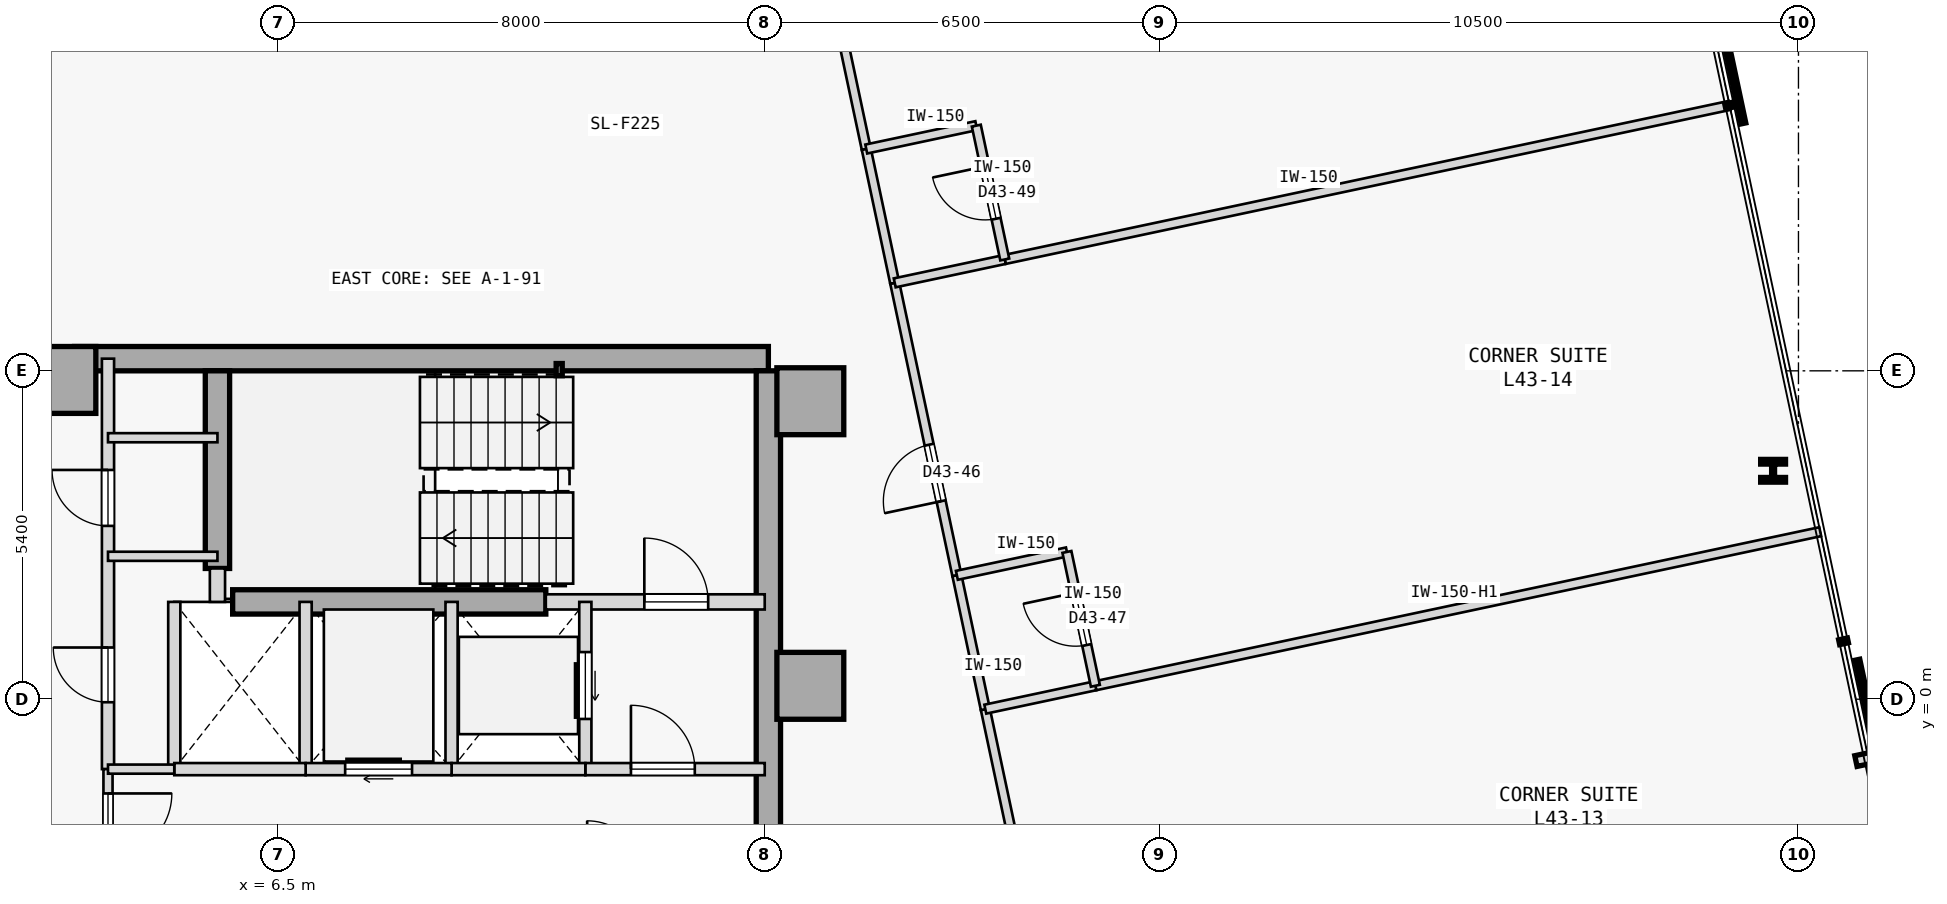
"""IFC4 building model, lengths in metres.
Left out: names, types, materials, properties, quantities, classifications, styles, units other than length and angle.
Written with IfcOpenShell. Run it as: python <this file> out.ifc"""

import sys

from ifc_helpers import new_model, si_unit, direction, frame, frame_2d, origin, origin_2d, place, context, subcontext, project, spatial, rectangle, hollow_rectangle, i_section, extrude, element, fill, save


model = new_model("IFC4")
c1 = context("Model", 3, precision=1e-05, world=origin(), true_north=direction((0.0, 1.0)))
c2 = subcontext(c1, "Body", "Model", "MODEL_VIEW")
j1 = project(units=[si_unit("LENGTHUNIT", "METRE"), si_unit("PLANEANGLEUNIT", "RADIAN")], contexts=[c1])
p1 = place(None, origin())
s1 = spatial("IfcSite", under=j1, at=p1, CompositionType="ELEMENT")
p2 = place(p1, origin())
s2 = spatial("IfcBuilding", under=s1, at=p2, CompositionType="ELEMENT")
p3 = place(p2, frame((0.0, 0.0, 168.4)))
s3 = spatial("IfcBuildingStorey", under=s2, at=p3, CompositionType="ELEMENT", Elevation=168.4)
for number, where, z_axis, x_axis in (
    (1, (15.25, 4.9, 0.0), (0.0, 0.0, 1.0), (1.0, 0.0, 0.0)),
    (2, (15.25, 0.22, 0.0), (0.0, 0.0, 1.0), (1.0, 0.0, 0.0)),
    (3, (2.95, 5.25, 0.0), (0.0, 0.0, 1.0), (1.0, 0.0, 0.0)),
):
    element("IfcColumn", number, at=place(p3, frame(where, z_axis=z_axis, x_axis=x_axis)), inside=s3, PredefinedType="COLUMN", context=c2, shape_type="SweptSolid", body=[
        extrude(rectangle(XDim=1.1, YDim=1.1, at=origin_2d()), origin(), (0.0, 0.0, 1.0), 3.4),
    ])
p4 = place(p3, frame((3.15, 5.6, 0.0), z_axis=(0.0, 0.0, 1.0), x_axis=(1.0, 0.0, 0.0)))
e4 = element("IfcWall", 4, at=p4, inside=s3, PredefinedType="SHEAR", context=c2, shape_type="SweptSolid", body=[
    extrude(rectangle(XDim=11.41, YDim=0.4, at=frame_2d((5.705, 0.0))), origin(), (0.0, 0.0, 1.0), 3.175),
])
p5 = place(p3, frame((14.56, -5.4, 0.0), z_axis=(0.0, 0.0, 1.0), x_axis=(0.0, 1.0, 0.0)))
e5 = element("IfcWall", 5, at=p5, inside=s3, PredefinedType="SHEAR", context=c2, shape_type="SweptSolid", body=[
    extrude(rectangle(XDim=10.8, YDim=0.4, at=frame_2d((5.4, 0.0))), origin(), (0.0, 0.0, 1.0), 3.175),
])
p6 = place(p3, frame((5.5, 2.15, 0.0), z_axis=(0.0, 0.0, 1.0), x_axis=(0.0, 1.0, 0.0)))
e6 = element("IfcWall", 6, at=p6, inside=s3, PredefinedType="SHEAR", context=c2, shape_type="SweptSolid", body=[
    extrude(rectangle(XDim=3.25, YDim=0.4, at=frame_2d((1.625, 0.0))), origin(), (0.0, 0.0, 1.0), 3.175),
])
p7 = place(p3, frame((5.75, 1.6, 0.0), z_axis=(0.0, 0.0, 1.0), x_axis=(1.0, 0.0, 0.0)))
e7 = element("IfcWall", 7, at=p7, inside=s3, PredefinedType="SHEAR", context=c2, shape_type="SweptSolid", body=[
    extrude(rectangle(XDim=5.15, YDim=0.4, at=frame_2d((2.575, 0.0))), origin(), (0.0, 0.0, 1.0), 3.175),
])
p8 = place(p3, frame((11.12, 5.42, 0.0), z_axis=(0.0, 0.0, 1.0), x_axis=(1.0, 0.0, 0.0)))
e8 = element("IfcColumn", 8, at=p8, inside=s3, PredefinedType="COLUMN", context=c2, shape_type="SweptSolid", body=[
    extrude(hollow_rectangle(XDim=0.1, YDim=0.2, WallThickness=0.008, at=origin_2d()), origin(), (0.0, 0.0, 1.0), 3.4),
])
p9 = place(p3, frame((31.083, 3.756, 0.0), z_axis=(0.0, 0.0, 1.0), x_axis=(1.0, 0.0, 0.0)))
e9 = element("IfcColumn", 9, at=p9, inside=s3, PredefinedType="COLUMN", context=c2, shape_type="SweptSolid", body=[
    extrude(i_section(OverallWidth=0.409, OverallDepth=0.374, WebThickness=0.048, FlangeThickness=0.077, FilletRadius=0.015, at=origin_2d()), origin(), (0.0, 0.0, 1.0), 3.4),
])
p10 = place(p3, frame((10.9, 1.6, 0.0), z_axis=(0.0, 0.0, 1.0), x_axis=(1.0, 0.0, 0.0)))
e10 = element("IfcWall", 10, at=p10, inside=s3, PredefinedType="STANDARD", context=c2, shape_type="SweptSolid", body=[
    extrude(rectangle(XDim=3.6, YDim=0.25, at=frame_2d((1.8, 0.0))), origin(), (0.0, 0.0, 1.0), 3.175),
])
p11 = place(p10, frame((1.62, 0.0, 0.0)))
e11 = element("IfcOpeningElement", 11, at=p11, cuts=e10, PredefinedType="OPENING", context=c2, shape_type="SweptSolid", body=[
    extrude(rectangle(XDim=1.05, YDim=2.15, at=frame_2d((0.525, 1.075))), frame((0.0, 0.135, 0.0), z_axis=(0.0, -1.0, 0.0), x_axis=(1.0, 0.0, 0.0)), (0.0, 0.0, 1.0), 0.27),
])
p12 = place(p3, frame((5.5, 1.6, 0.0), z_axis=(0.0, 0.0, 1.0), x_axis=(0.0, 1.0, 0.0)))
e12 = element("IfcWall", 12, at=p12, inside=s3, PredefinedType="STANDARD", context=c2, shape_type="SweptSolid", body=[
    extrude(rectangle(XDim=0.55, YDim=0.25, at=frame_2d((0.275, 0.0))), origin(), (0.0, 0.0, 1.0), 3.175),
])
p13 = place(p3, frame((3.7, -1.15, 0.0), z_axis=(0.0, 0.0, 1.0), x_axis=(0.0, 1.0, 0.0)))
e13 = element("IfcWall", 13, at=p13, inside=s3, PredefinedType="STANDARD", context=c2, shape_type="SweptSolid", body=[
    extrude(rectangle(XDim=6.75, YDim=0.2, at=frame_2d((3.375, 0.0))), origin(), (0.0, 0.0, 1.0), 3.175),
])
p14 = place(p13, frame((1.1, 0.0, 0.0)))
e14 = element("IfcOpeningElement", 14, at=p14, cuts=e13, PredefinedType="OPENING", context=c2, shape_type="SweptSolid", body=[
    extrude(rectangle(XDim=0.9, YDim=2.15, at=frame_2d((0.45, 1.075))), frame((0.0, 0.11, 0.0), z_axis=(0.0, -1.0, 0.0), x_axis=(1.0, 0.0, 0.0)), (0.0, 0.0, 1.0), 0.22),
])
p15 = place(p13, frame((4.0, 0.0, 0.0)))
e15 = element("IfcOpeningElement", 15, at=p15, cuts=e13, PredefinedType="OPENING", context=c2, shape_type="SweptSolid", body=[
    extrude(rectangle(XDim=0.92, YDim=2.15, at=frame_2d((0.46, 1.075))), frame((0.0, 0.11, 0.0), z_axis=(0.0, -1.0, 0.0), x_axis=(1.0, 0.0, 0.0)), (0.0, 0.0, 1.0), 0.22),
])
p16 = place(p3, frame((3.7, -2.95, 0.0), z_axis=(0.0, 0.0, 1.0), x_axis=(0.0, 1.0, 0.0)))
e16 = element("IfcWall", 16, at=p16, inside=s3, PredefinedType="PARTITIONING", context=c2, shape_type="SweptSolid", body=[
    extrude(rectangle(XDim=1.8, YDim=0.15, at=frame_2d((0.9, 0.0))), origin(), (0.0, 0.0, 1.0), 3.175),
])
p17 = place(p16, frame((0.35, 0.0, 0.0)))
e17 = element("IfcOpeningElement", 17, at=p17, cuts=e16, PredefinedType="OPENING", context=c2, shape_type="SweptSolid", body=[
    extrude(rectangle(XDim=1.05, YDim=2.18, at=frame_2d((0.525, 1.09))), frame((0.0, 0.085, 0.0), z_axis=(0.0, -1.0, 0.0), x_axis=(1.0, 0.0, 0.0)), (0.0, 0.0, 1.0), 0.17),
])
p18 = place(p3, frame((11.55, -1.15, 0.0), z_axis=(0.0, 0.0, 1.0), x_axis=(0.0, 1.0, 0.0)))
e18 = element("IfcWall", 18, at=p18, inside=s3, PredefinedType="STANDARD", context=c2, shape_type="SweptSolid", body=[
    extrude(rectangle(XDim=2.75, YDim=0.2, at=frame_2d((1.375, 0.0))), origin(), (0.0, 0.0, 1.0), 3.175),
])
p19 = place(p18, frame((0.825, 0.0, 0.0)))
e19 = element("IfcOpeningElement", 19, at=p19, cuts=e18, PredefinedType="OPENING", context=c2, shape_type="SweptSolid", body=[
    extrude(rectangle(XDim=1.1, YDim=2.15, at=frame_2d((0.55, 1.075))), frame((0.0, 0.11, 0.0), z_axis=(0.0, -1.0, 0.0), x_axis=(1.0, 0.0, 0.0)), (0.0, 0.0, 1.0), 0.22),
])
p20 = place(p3, frame((9.35, -1.15, 0.0), z_axis=(0.0, 0.0, 1.0), x_axis=(0.0, 1.0, 0.0)))
e20 = element("IfcWall", 20, at=p20, inside=s3, PredefinedType="STANDARD", context=c2, shape_type="SweptSolid", body=[
    extrude(rectangle(XDim=2.75, YDim=0.2, at=frame_2d((1.375, 0.0))), origin(), (0.0, 0.0, 1.0), 3.175),
])
p21 = place(p3, frame((11.55, -1.15, 0.0), z_axis=(0.0, 0.0, 1.0), x_axis=(1.0, 0.0, 0.0)))
e21 = element("IfcWall", 21, at=p21, inside=s3, PredefinedType="STANDARD", context=c2, shape_type="SweptSolid", body=[
    extrude(rectangle(XDim=2.95, YDim=0.2, at=frame_2d((1.475, 0.0))), origin(), (0.0, 0.0, 1.0), 3.175),
])
p22 = place(p21, frame((0.75, 0.0, 0.0)))
e22 = element("IfcOpeningElement", 22, at=p22, cuts=e21, PredefinedType="OPENING", context=c2, shape_type="SweptSolid", body=[
    extrude(rectangle(XDim=1.05, YDim=2.18, at=frame_2d((0.525, 1.09))), frame((0.0, 0.11, 0.0), z_axis=(0.0, -1.0, 0.0), x_axis=(1.0, 0.0, 0.0)), (0.0, 0.0, 1.0), 0.22),
])
p23 = place(p3, frame((9.35, -1.15, 0.0), z_axis=(0.0, 0.0, 1.0), x_axis=(1.0, 0.0, 0.0)))
e23 = element("IfcWall", 23, at=p23, inside=s3, PredefinedType="STANDARD", context=c2, shape_type="SweptSolid", body=[
    extrude(rectangle(XDim=2.2, YDim=0.2, at=frame_2d((1.1, 0.0))), origin(), (0.0, 0.0, 1.0), 3.175),
])
p24 = place(p3, frame((6.95, -1.15, 0.0), z_axis=(0.0, 0.0, 1.0), x_axis=(0.0, 1.0, 0.0)))
e24 = element("IfcWall", 24, at=p24, inside=s3, PredefinedType="STANDARD", context=c2, shape_type="SweptSolid", body=[
    extrude(rectangle(XDim=2.75, YDim=0.2, at=frame_2d((1.375, 0.0))), origin(), (0.0, 0.0, 1.0), 3.175),
])
p25 = place(p3, frame((6.95, -1.15, 0.0), z_axis=(0.0, 0.0, 1.0), x_axis=(1.0, 0.0, 0.0)))
e25 = element("IfcWall", 25, at=p25, inside=s3, PredefinedType="STANDARD", context=c2, shape_type="SweptSolid", body=[
    extrude(rectangle(XDim=2.4, YDim=0.2, at=frame_2d((1.2, 0.0))), origin(), (0.0, 0.0, 1.0), 3.175),
])
p26 = place(p25, frame((0.65, 0.0, 0.0)))
e26 = element("IfcOpeningElement", 26, at=p26, cuts=e25, PredefinedType="OPENING", context=c2, shape_type="SweptSolid", body=[
    extrude(rectangle(XDim=1.1, YDim=2.15, at=frame_2d((0.55, 1.075))), frame((0.0, 0.11, 0.0), z_axis=(0.0, -1.0, 0.0), x_axis=(1.0, 0.0, 0.0)), (0.0, 0.0, 1.0), 0.22),
])
p27 = place(p3, frame((4.79, -1.15, 0.0), z_axis=(0.0, 0.0, 1.0), x_axis=(0.0, 1.0, 0.0)))
e27 = element("IfcWall", 27, at=p27, inside=s3, PredefinedType="STANDARD", context=c2, shape_type="SweptSolid", body=[
    extrude(rectangle(XDim=2.75, YDim=0.2, at=frame_2d((1.375, 0.0))), origin(), (0.0, 0.0, 1.0), 3.175),
])
p28 = place(p3, frame((4.79, -1.15, 0.0), z_axis=(0.0, 0.0, 1.0), x_axis=(1.0, 0.0, 0.0)))
e28 = element("IfcWall", 28, at=p28, inside=s3, PredefinedType="STANDARD", context=c2, shape_type="SweptSolid", body=[
    extrude(rectangle(XDim=2.16, YDim=0.2, at=frame_2d((1.08, 0.0))), origin(), (0.0, 0.0, 1.0), 3.175),
])
p29 = place(p3, frame((3.7, -1.15, 0.0), z_axis=(0.0, 0.0, 1.0), x_axis=(1.0, 0.0, 0.0)))
e29 = element("IfcWall", 29, at=p29, inside=s3, PredefinedType="PARTITIONING", context=c2, shape_type="SweptSolid", body=[
    extrude(rectangle(XDim=1.09, YDim=0.15, at=frame_2d((0.545, 0.0))), origin(), (0.0, 0.0, 1.0), 3.175),
])
for number, where, z_axis, x_axis in (
    (30, (3.7, 4.3, 0.0), (0.0, 0.0, 1.0), (1.0, 0.0, 0.0)),
    (31, (3.7, 2.35, 0.0), (0.0, 0.0, 1.0), (1.0, 0.0, 0.0)),
):
    element("IfcWall", number, at=place(p3, frame(where, z_axis=z_axis, x_axis=x_axis)), inside=s3, PredefinedType="PARTITIONING", context=c2, shape_type="SweptSolid", body=[
        extrude(rectangle(XDim=1.8, YDim=0.15, at=frame_2d((0.9, 0.0))), origin(), (0.0, 0.0, 1.0), 3.175),
    ])
p30 = place(p3, frame((19.15, -4.972, 0.0), z_axis=(0.0, 0.0, 1.0), x_axis=(-0.207934781332, 0.978142692409, 0.0)))
e32 = element("IfcWall", 32, at=p30, inside=s3, PredefinedType="PARTITIONING", context=c2, shape_type="SweptSolid", body=[
    extrude(rectangle(XDim=4.916, YDim=0.15, at=frame_2d((2.458, 0.0))), origin(), (0.0, 0.0, 1.0), 3.175),
])
p31 = place(p30, frame((1.983, 0.0, 0.0)))
e33 = element("IfcOpeningElement", 33, at=p31, cuts=e32, PredefinedType="OPENING", context=c2, shape_type="SweptSolid", body=[
    extrude(rectangle(XDim=0.95, YDim=2.15, at=frame_2d((0.475, 1.075))), frame((0.0, 0.085, 0.0), z_axis=(0.0, -1.0, 0.0), x_axis=(1.0, 0.0, 0.0)), (0.0, 0.0, 1.0), 0.17),
])
p32 = place(p3, frame((17.66, 2.037, 0.0), z_axis=(0.0, 0.0, 1.0), x_axis=(-0.207894386012, 0.978151278824, 0.0)))
e34 = element("IfcWall", 34, at=p32, inside=s3, PredefinedType="PARTITIONING", context=c2, shape_type="SweptSolid", body=[
    extrude(rectangle(XDim=4.917, YDim=0.15, at=frame_2d((2.458, 0.0))), origin(), (0.0, 0.0, 1.0), 3.175),
])
p33 = place(p32, frame((1.246, 0.0, 0.0)))
e35 = element("IfcOpeningElement", 35, at=p33, cuts=e34, PredefinedType="OPENING", context=c2, shape_type="SweptSolid", body=[
    extrude(rectangle(XDim=0.95, YDim=2.15, at=frame_2d((0.475, 1.075))), frame((0.0, 0.085, 0.0), z_axis=(0.0, -1.0, 0.0), x_axis=(1.0, 0.0, 0.0)), (0.0, 0.0, 1.0), 0.17),
])
p34 = place(p3, frame((18.128, -0.164, 0.0), z_axis=(0.0, 0.0, 1.0), x_axis=(-0.207891197838, 0.978151956427, 0.0)))
e36 = element("IfcWall", 36, at=p34, inside=s3, PredefinedType="PARTITIONING", context=c2, shape_type="SweptSolid", body=[
    extrude(rectangle(XDim=2.25, YDim=0.15, at=frame_2d((1.125, 0.0))), origin(), (0.0, 0.0, 1.0), 3.175),
])
p35 = place(p3, frame((16.17, 9.047, 0.0), z_axis=(0.0, 0.0, 1.0), x_axis=(-0.20792851832, 0.978144023787, 0.0)))
e37 = element("IfcWall", 37, at=p35, inside=s3, PredefinedType="PARTITIONING", context=c2, shape_type="SweptSolid", body=[
    extrude(rectangle(XDim=4.855, YDim=0.15, at=frame_2d((2.428, 0.0))), origin(), (0.0, 0.0, 1.0), 3.175),
])
p36 = place(p35, frame((1.952, 0.0, 0.0)))
e38 = element("IfcOpeningElement", 38, at=p36, cuts=e37, PredefinedType="OPENING", context=c2, shape_type="SweptSolid", body=[
    extrude(rectangle(XDim=0.95, YDim=2.15, at=frame_2d((0.475, 1.075))), frame((0.0, 0.085, 0.0), z_axis=(0.0, -1.0, 0.0), x_axis=(1.0, 0.0, 0.0)), (0.0, 0.0, 1.0), 0.17),
])
p37 = place(p3, frame((16.638, 6.847, 0.0), z_axis=(0.0, 0.0, 1.0), x_axis=(-0.207913264065, 0.978147266328, 0.0)))
e39 = element("IfcWall", 39, at=p37, inside=s3, PredefinedType="PARTITIONING", context=c2, shape_type="SweptSolid", body=[
    extrude(rectangle(XDim=2.25, YDim=0.15, at=frame_2d((1.125, 0.0))), origin(), (0.0, 0.0, 1.0), 3.175),
])
p38 = place(p3, frame((19.938, 0.221, 0.0), z_axis=(0.0, 0.0, 1.0), x_axis=(0.978144694478, 0.207925363208, 0.0)))
e40 = element("IfcWall", 40, at=p38, inside=s3, PredefinedType="PARTITIONING", context=c2, shape_type="SweptSolid", body=[
    extrude(rectangle(XDim=12.187, YDim=0.15, at=frame_2d((6.093, 0.0))), origin(), (0.0, 0.0, 1.0), 2.725),
])
p39 = place(p3, frame((18.128, -0.164, 0.0), z_axis=(0.0, 0.0, 1.0), x_axis=(0.978165892835, 0.207825614625, 0.0)))
e41 = element("IfcWall", 41, at=p39, inside=s3, PredefinedType="PARTITIONING", context=c2, shape_type="SweptSolid", body=[
    extrude(rectangle(XDim=1.85, YDim=0.15, at=frame_2d((0.925, 0.0))), origin(), (0.0, 0.0, 1.0), 3.175),
])
p40 = place(p3, frame((17.66, 2.037, 0.0), z_axis=(0.0, 0.0, 1.0), x_axis=(0.978160192495, 0.207852442415, 0.0)))
e42 = element("IfcWall", 42, at=p40, inside=s3, PredefinedType="PARTITIONING", context=c2, shape_type="SweptSolid", body=[
    extrude(rectangle(XDim=1.85, YDim=0.15, at=frame_2d((0.925, 0.0))), origin(), (0.0, 0.0, 1.0), 3.175),
])
p41 = place(p3, frame((19.938, 0.221, 0.0), z_axis=(0.0, 0.0, 1.0), x_axis=(-0.207995007687, 0.978129887478, 0.0)))
e43 = element("IfcWall", 43, at=p41, inside=s3, PredefinedType="PARTITIONING", context=c2, shape_type="SweptSolid", body=[
    extrude(rectangle(XDim=2.25, YDim=0.15, at=frame_2d((1.125, 0.0))), origin(), (0.0, 0.0, 1.0), 3.175),
])
p42 = place(p41, frame((0.685, 0.0, 0.0)))
e44 = element("IfcOpeningElement", 44, at=p42, cuts=e43, PredefinedType="OPENING", context=c2, shape_type="SweptSolid", body=[
    extrude(rectangle(XDim=0.88, YDim=2.15, at=frame_2d((0.44, 1.075))), frame((0.0, 0.085, 0.0), z_axis=(0.0, -1.0, 0.0), x_axis=(1.0, 0.0, 0.0)), (0.0, 0.0, 1.0), 0.17),
])
p43 = place(p3, frame((18.447, 7.231, 0.0), z_axis=(0.0, 0.0, 1.0), x_axis=(0.978149634612, 0.207902121941, 0.0)))
e45 = element("IfcWall", 45, at=p43, inside=s3, PredefinedType="PARTITIONING", context=c2, shape_type="SweptSolid", body=[
    extrude(rectangle(XDim=12.187, YDim=0.15, at=frame_2d((6.094, 0.0))), origin(), (0.0, 0.0, 1.0), 3.175),
])
p44 = place(p3, frame((16.638, 6.847, 0.0), z_axis=(0.0, 0.0, 1.0), x_axis=(0.978160192495, 0.207852442415, 0.0)))
e46 = element("IfcWall", 46, at=p44, inside=s3, PredefinedType="PARTITIONING", context=c2, shape_type="SweptSolid", body=[
    extrude(rectangle(XDim=1.85, YDim=0.15, at=frame_2d((0.925, 0.0))), origin(), (0.0, 0.0, 1.0), 3.175),
])
p45 = place(p3, frame((16.17, 9.047, 0.0), z_axis=(0.0, 0.0, 1.0), x_axis=(0.978133353907, 0.20797870558, 0.0)))
e47 = element("IfcWall", 47, at=p45, inside=s3, PredefinedType="PARTITIONING", context=c2, shape_type="SweptSolid", body=[
    extrude(rectangle(XDim=1.85, YDim=0.15, at=frame_2d((0.925, 0.0))), origin(), (0.0, 0.0, 1.0), 3.175),
])
p46 = place(p3, frame((18.447, 7.231, 0.0), z_axis=(0.0, 0.0, 1.0), x_axis=(-0.207891197838, 0.978151956427, 0.0)))
e48 = element("IfcWall", 48, at=p46, inside=s3, PredefinedType="PARTITIONING", context=c2, shape_type="SweptSolid", body=[
    extrude(rectangle(XDim=2.25, YDim=0.15, at=frame_2d((1.125, 0.0))), origin(), (0.0, 0.0, 1.0), 3.175),
])
p47 = place(p46, frame((0.685, 0.0, 0.0)))
e49 = element("IfcOpeningElement", 49, at=p47, cuts=e48, PredefinedType="OPENING", context=c2, shape_type="SweptSolid", body=[
    extrude(rectangle(XDim=0.88, YDim=2.15, at=frame_2d((0.44, 1.075))), frame((0.0, 0.085, 0.0), z_axis=(0.0, -1.0, 0.0), x_axis=(1.0, 0.0, 0.0)), (0.0, 0.0, 1.0), 0.17),
])
p48 = place(p11, origin())
e50 = element("IfcDoor", 50, at=p48, inside=s3, OperationType="SINGLE_SWING_LEFT", PredefinedType="DOOR", context=c2, shape_type="SweptSolid", body=[
    extrude(rectangle(XDim=1.05, YDim=2.15, at=frame_2d((0.525, 1.075))), frame((0.0, 0.025, 0.0), z_axis=(0.0, -1.0, 0.0), x_axis=(1.0, 0.0, 0.0)), (0.0, 0.0, 1.0), 0.05),
])
fill(e11, e50)
p49 = place(p22, origin())
e51 = element("IfcDoor", 51, at=p49, inside=s3, OperationType="SINGLE_SWING_LEFT", PredefinedType="DOOR", context=c2, shape_type="SweptSolid", body=[
    extrude(rectangle(XDim=1.05, YDim=2.18, at=frame_2d((0.525, 1.09))), frame((0.0, 0.025, 0.0), z_axis=(0.0, -1.0, 0.0), x_axis=(1.0, 0.0, 0.0)), (0.0, 0.0, 1.0), 0.05),
])
fill(e22, e51)
p50 = place(p17, frame((1.05, 0.0, 0.0), z_axis=(0.0, 0.0, 1.0), x_axis=(-1.0, 0.0, 0.0)))
e52 = element("IfcDoor", 52, at=p50, inside=s3, OperationType="SINGLE_SWING_RIGHT", PredefinedType="DOOR", context=c2, shape_type="SweptSolid", body=[
    extrude(rectangle(XDim=1.05, YDim=2.18, at=frame_2d((0.525, 1.09))), frame((0.0, 0.025, 0.0), z_axis=(0.0, -1.0, 0.0), x_axis=(1.0, 0.0, 0.0)), (0.0, 0.0, 1.0), 0.05),
])
fill(e17, e52)
p51 = place(p19, origin())
e53 = element("IfcDoor", 53, at=p51, inside=s3, OperationType="SLIDING_TO_RIGHT", PredefinedType="DOOR", context=c2, shape_type="SweptSolid", body=[
    extrude(rectangle(XDim=1.1, YDim=2.15, at=frame_2d((0.55, 1.075))), frame((0.0, 0.025, 0.0), z_axis=(0.0, -1.0, 0.0), x_axis=(1.0, 0.0, 0.0)), (0.0, 0.0, 1.0), 0.05),
])
fill(e19, e53)
p52 = place(p26, origin())
e54 = element("IfcDoor", 54, at=p52, inside=s3, OperationType="SLIDING_TO_RIGHT", PredefinedType="DOOR", context=c2, shape_type="SweptSolid", body=[
    extrude(rectangle(XDim=1.1, YDim=2.15, at=frame_2d((0.55, 1.075))), frame((0.0, 0.025, 0.0), z_axis=(0.0, -1.0, 0.0), x_axis=(1.0, 0.0, 0.0)), (0.0, 0.0, 1.0), 0.05),
])
fill(e26, e54)
p53 = place(p14, origin())
e55 = element("IfcDoor", 55, at=p53, inside=s3, OperationType="SINGLE_SWING_RIGHT", PredefinedType="DOOR", context=c2, shape_type="SweptSolid", body=[
    extrude(rectangle(XDim=0.9, YDim=2.15, at=frame_2d((0.45, 1.075))), frame((0.0, 0.025, 0.0), z_axis=(0.0, -1.0, 0.0), x_axis=(1.0, 0.0, 0.0)), (0.0, 0.0, 1.0), 0.05),
])
fill(e14, e55)
p54 = place(p15, origin())
e56 = element("IfcDoor", 56, at=p54, inside=s3, OperationType="SINGLE_SWING_RIGHT", PredefinedType="DOOR", context=c2, shape_type="SweptSolid", body=[
    extrude(rectangle(XDim=0.92, YDim=2.15, at=frame_2d((0.46, 1.075))), frame((0.0, 0.025, 0.0), z_axis=(0.0, -1.0, 0.0), x_axis=(1.0, 0.0, 0.0)), (0.0, 0.0, 1.0), 0.05),
])
fill(e15, e56)
p55 = place(p33, origin())
e57 = element("IfcDoor", 57, at=p55, inside=s3, OperationType="SINGLE_SWING_LEFT", PredefinedType="DOOR", context=c2, shape_type="SweptSolid", body=[
    extrude(rectangle(XDim=0.95, YDim=2.15, at=frame_2d((0.475, 1.075))), frame((0.0, 0.025, 0.0), z_axis=(0.0, -1.0, 0.0), x_axis=(1.0, 0.0, 0.0)), (0.0, 0.0, 1.0), 0.05),
])
fill(e35, e57)
p56 = place(p42, origin())
e58 = element("IfcDoor", 58, at=p56, inside=s3, OperationType="SINGLE_SWING_RIGHT", PredefinedType="DOOR", context=c2, shape_type="SweptSolid", body=[
    extrude(rectangle(XDim=0.88, YDim=2.15, at=frame_2d((0.44, 1.075))), frame((0.0, 0.025, 0.0), z_axis=(0.0, -1.0, 0.0), x_axis=(1.0, 0.0, 0.0)), (0.0, 0.0, 1.0), 0.05),
])
fill(e44, e58)
p57 = place(p47, origin())
e59 = element("IfcDoor", 59, at=p57, inside=s3, OperationType="SINGLE_SWING_RIGHT", PredefinedType="DOOR", context=c2, shape_type="SweptSolid", body=[
    extrude(rectangle(XDim=0.88, YDim=2.15, at=frame_2d((0.44, 1.075))), frame((0.0, 0.025, 0.0), z_axis=(0.0, -1.0, 0.0), x_axis=(1.0, 0.0, 0.0)), (0.0, 0.0, 1.0), 0.05),
])
fill(e49, e59)
save(model, sys.argv[1])
